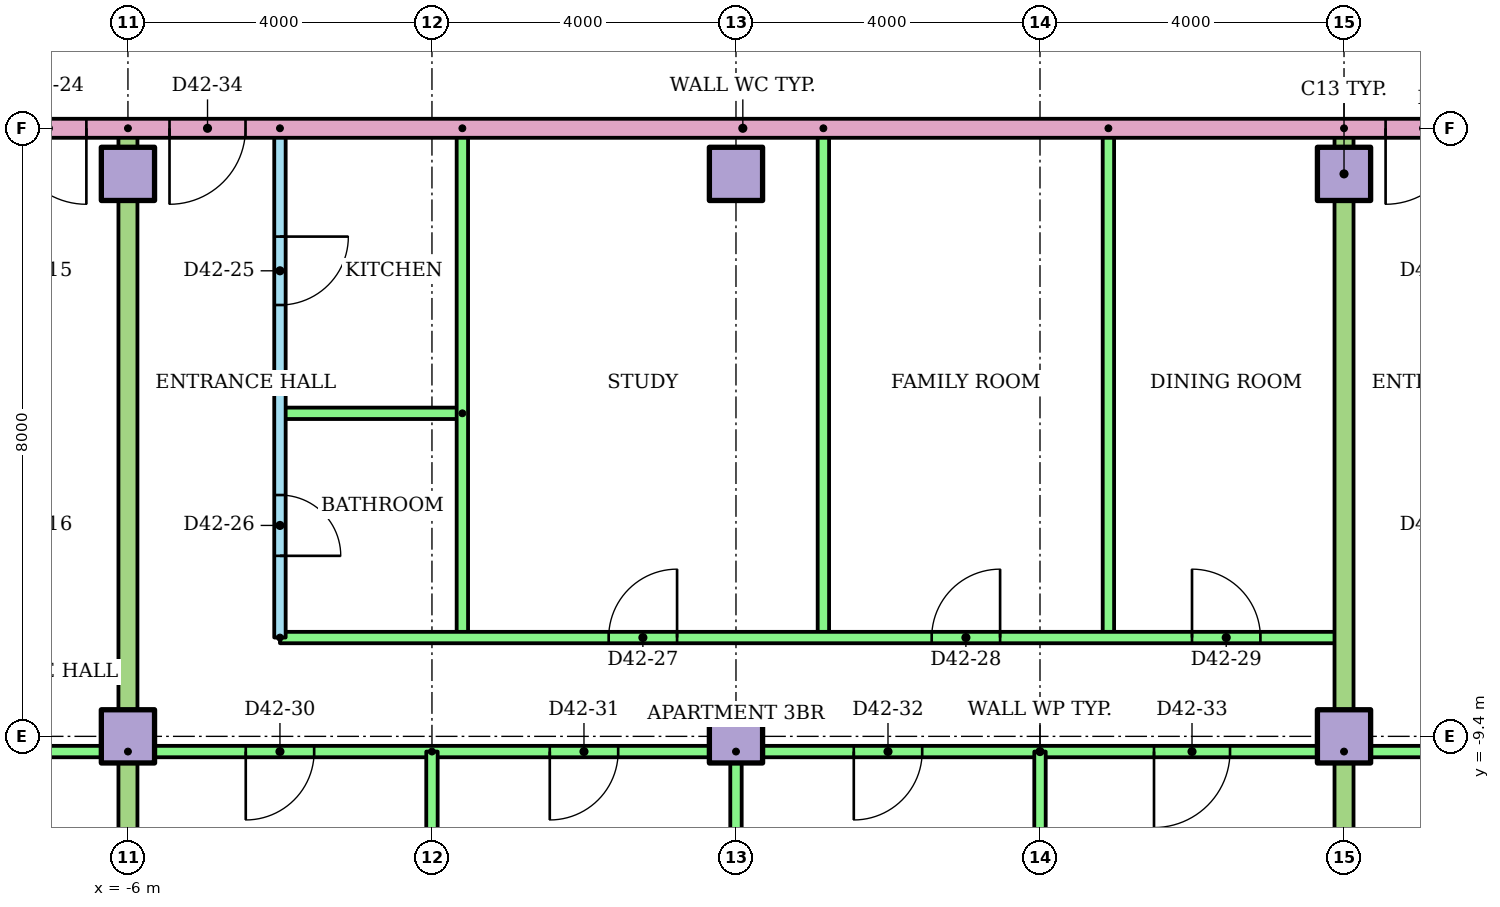
"""IFC4 building model, lengths in metres.
Left out: names, types, materials, properties, quantities, classifications, styles, units other than length and angle.
Written with IfcOpenShell. Run it as: python <this file> out.ifc"""

import sys

from ifc_helpers import new_model, si_unit, direction, frame, frame_2d, origin, origin_2d, place, context, subcontext, project, spatial, rectangle, extrude, element, fill, save


model = new_model("IFC4")
c1 = context("Model", 3, precision=1e-05, world=origin(), true_north=direction((0.0, 1.0)))
c2 = subcontext(c1, "Body", "Model", "MODEL_VIEW")
j1 = project(units=[si_unit("LENGTHUNIT", "METRE"), si_unit("PLANEANGLEUNIT", "RADIAN")], contexts=[c1])
p1 = place(None, origin())
s1 = spatial("IfcSite", under=j1, at=p1, CompositionType="ELEMENT")
p2 = place(p1, origin())
s2 = spatial("IfcBuilding", under=s1, at=p2, CompositionType="ELEMENT")
p3 = place(p2, frame((0.0, 0.0, 165.3)))
s3 = spatial("IfcBuildingStorey", under=s2, at=p3, CompositionType="ELEMENT", Elevation=165.3)
for number, where in (
    (1, (-6.0, -9.4, 0.0)),
    (2, (2.0, -9.4, 0.0)),
    (3, (10.0, -9.4, 0.0)),
    (4, (-6.0, -2.0, 0.0)),
    (5, (2.0, -2.0, 0.0)),
    (6, (10.0, -2.0, 0.0)),
):
    element("IfcColumn", number, at=place(p3, frame(where)), inside=s3, PredefinedType="COLUMN", context=c2, shape_type="SweptSolid", body=[
        extrude(rectangle(XDim=0.7, YDim=0.7, at=origin_2d()), origin(), (0.0, 0.0, 1.0), 3.2),
    ])
p4 = place(p3, frame((-6.0, -9.6, 0.0), z_axis=(0.0, 0.0, 1.0), x_axis=(-1.0, 0.0, 0.0)))
e7 = element("IfcWall", 7, at=p4, inside=s3, PredefinedType="PARTITIONING", context=c2, shape_type="SweptSolid", body=[
    extrude(rectangle(XDim=18.82, YDim=0.15, at=frame_2d((9.41, 0.0))), origin(), (0.0, 0.0, 1.0), 2.4),
])
p5 = place(p4, frame((16.547, 0.0, 0.0)))
e8 = element("IfcOpeningElement", 8, at=p5, cuts=e7, PredefinedType="OPENING", context=c2, shape_type="SweptSolid", body=[
    extrude(rectangle(XDim=0.9, YDim=2.1, at=frame_2d((0.45, 1.05))), frame((0.0, 0.085, 0.0), z_axis=(0.0, -1.0, 0.0), x_axis=(1.0, 0.0, 0.0)), (0.0, 0.0, 1.0), 0.17),
])
p6 = place(p4, frame((10.45, 0.0, 0.0)))
e9 = element("IfcOpeningElement", 9, at=p6, cuts=e7, PredefinedType="OPENING", context=c2, shape_type="SweptSolid", body=[
    extrude(rectangle(XDim=0.9, YDim=2.1, at=frame_2d((0.45, 1.05))), frame((0.0, 0.085, 0.0), z_axis=(0.0, -1.0, 0.0), x_axis=(1.0, 0.0, 0.0)), (0.0, 0.0, 1.0), 0.17),
])
p7 = place(p4, frame((3.5, 0.0, 0.0)))
e10 = element("IfcOpeningElement", 10, at=p7, cuts=e7, PredefinedType="OPENING", context=c2, shape_type="SweptSolid", body=[
    extrude(rectangle(XDim=1.0, YDim=2.1, at=frame_2d((0.5, 1.05))), frame((0.0, 0.085, 0.0), z_axis=(0.0, -1.0, 0.0), x_axis=(1.0, 0.0, 0.0)), (0.0, 0.0, 1.0), 0.17),
])
p8 = place(p3, frame((-4.0, -1.4, 0.0), z_axis=(0.0, 0.0, 1.0), x_axis=(0.0, -1.0, 0.0)))
e11 = element("IfcWall", 11, at=p8, inside=s3, PredefinedType="PARTITIONING", context=c2, shape_type="SweptSolid", body=[
    extrude(rectangle(XDim=6.7, YDim=0.15, at=frame_2d((3.35, 0.0))), origin(), (0.0, 0.0, 1.0), 2.4),
])
p9 = place(p8, frame((1.425, 0.0, 0.0)))
e12 = element("IfcOpeningElement", 12, at=p9, cuts=e11, PredefinedType="OPENING", context=c2, shape_type="SweptSolid", body=[
    extrude(rectangle(XDim=0.9, YDim=2.1, at=frame_2d((0.45, 1.05))), frame((0.0, 0.085, 0.0), z_axis=(0.0, -1.0, 0.0), x_axis=(1.0, 0.0, 0.0)), (0.0, 0.0, 1.0), 0.17),
])
p10 = place(p8, frame((4.825, 0.0, 0.0)))
e13 = element("IfcOpeningElement", 13, at=p10, cuts=e11, PredefinedType="OPENING", context=c2, shape_type="SweptSolid", body=[
    extrude(rectangle(XDim=0.8, YDim=2.1, at=frame_2d((0.4, 1.05))), frame((0.0, 0.085, 0.0), z_axis=(0.0, -1.0, 0.0), x_axis=(1.0, 0.0, 0.0)), (0.0, 0.0, 1.0), 0.17),
])
p11 = place(p3, frame((-1.6, -5.15, 0.0), z_axis=(0.0, 0.0, 1.0), x_axis=(-1.0, 0.0, 0.0)))
e14 = element("IfcWall", 14, at=p11, inside=s3, PredefinedType="PARTITIONING", context=c2, shape_type="SweptSolid", body=[
    extrude(rectangle(XDim=2.4, YDim=0.15, at=frame_2d((1.2, 0.0))), origin(), (0.0, 0.0, 1.0), 2.4),
])
for number, where, z_axis, x_axis in (
    (15, (-1.6, -1.4, 0.0), (0.0, 0.0, 1.0), (0.0, -1.0, 0.0)),
    (16, (3.15, -1.4, 0.0), (0.0, 0.0, 1.0), (0.0, -1.0, 0.0)),
    (17, (6.9, -1.4, 0.0), (0.0, 0.0, 1.0), (0.0, -1.0, 0.0)),
):
    element("IfcWall", number, at=place(p3, frame(where, z_axis=z_axis, x_axis=x_axis)), inside=s3, PredefinedType="PARTITIONING", context=c2, shape_type="SweptSolid", body=[
        extrude(rectangle(XDim=6.7, YDim=0.15, at=frame_2d((3.35, 0.0))), origin(), (0.0, 0.0, 1.0), 2.4),
    ])
p12 = place(p3, frame((-4.0, -8.1, 0.0)))
e18 = element("IfcWall", 18, at=p12, inside=s3, PredefinedType="PARTITIONING", context=c2, shape_type="SweptSolid", body=[
    extrude(rectangle(XDim=14.0, YDim=0.15, at=frame_2d((7.0, 0.0))), origin(), (0.0, 0.0, 1.0), 2.4),
])
p13 = place(p12, frame((4.325, 0.0, 0.0)))
e19 = element("IfcOpeningElement", 19, at=p13, cuts=e18, PredefinedType="OPENING", context=c2, shape_type="SweptSolid", body=[
    extrude(rectangle(XDim=0.9, YDim=2.1, at=frame_2d((0.45, 1.05))), frame((0.0, 0.085, 0.0), z_axis=(0.0, -1.0, 0.0), x_axis=(1.0, 0.0, 0.0)), (0.0, 0.0, 1.0), 0.17),
])
p14 = place(p12, frame((8.575, 0.0, 0.0)))
e20 = element("IfcOpeningElement", 20, at=p14, cuts=e18, PredefinedType="OPENING", context=c2, shape_type="SweptSolid", body=[
    extrude(rectangle(XDim=0.9, YDim=2.1, at=frame_2d((0.45, 1.05))), frame((0.0, 0.085, 0.0), z_axis=(0.0, -1.0, 0.0), x_axis=(1.0, 0.0, 0.0)), (0.0, 0.0, 1.0), 0.17),
])
p15 = place(p12, frame((12.0, 0.0, 0.0)))
e21 = element("IfcOpeningElement", 21, at=p15, cuts=e18, PredefinedType="OPENING", context=c2, shape_type="SweptSolid", body=[
    extrude(rectangle(XDim=0.9, YDim=2.1, at=frame_2d((0.45, 1.05))), frame((0.0, 0.085, 0.0), z_axis=(0.0, -1.0, 0.0), x_axis=(1.0, 0.0, 0.0)), (0.0, 0.0, 1.0), 0.17),
])
p16 = place(p3, frame((10.0, -9.6, 0.0), z_axis=(0.0, 0.0, 1.0), x_axis=(-1.0, 0.0, 0.0)))
e22 = element("IfcWall", 22, at=p16, inside=s3, PredefinedType="PARTITIONING", context=c2, shape_type="SweptSolid", body=[
    extrude(rectangle(XDim=16.0, YDim=0.15, at=frame_2d((8.0, 0.0))), origin(), (0.0, 0.0, 1.0), 2.4),
])
p17 = place(p16, frame((13.55, 0.0, 0.0)))
e23 = element("IfcOpeningElement", 23, at=p17, cuts=e22, PredefinedType="OPENING", context=c2, shape_type="SweptSolid", body=[
    extrude(rectangle(XDim=0.9, YDim=2.1, at=frame_2d((0.45, 1.05))), frame((0.0, 0.085, 0.0), z_axis=(0.0, -1.0, 0.0), x_axis=(1.0, 0.0, 0.0)), (0.0, 0.0, 1.0), 0.17),
])
p18 = place(p16, frame((9.55, 0.0, 0.0)))
e24 = element("IfcOpeningElement", 24, at=p18, cuts=e22, PredefinedType="OPENING", context=c2, shape_type="SweptSolid", body=[
    extrude(rectangle(XDim=0.9, YDim=2.1, at=frame_2d((0.45, 1.05))), frame((0.0, 0.085, 0.0), z_axis=(0.0, -1.0, 0.0), x_axis=(1.0, 0.0, 0.0)), (0.0, 0.0, 1.0), 0.17),
])
p19 = place(p16, frame((5.55, 0.0, 0.0)))
e25 = element("IfcOpeningElement", 25, at=p19, cuts=e22, PredefinedType="OPENING", context=c2, shape_type="SweptSolid", body=[
    extrude(rectangle(XDim=0.9, YDim=2.1, at=frame_2d((0.45, 1.05))), frame((0.0, 0.085, 0.0), z_axis=(0.0, -1.0, 0.0), x_axis=(1.0, 0.0, 0.0)), (0.0, 0.0, 1.0), 0.17),
])
p20 = place(p16, frame((1.5, 0.0, 0.0)))
e26 = element("IfcOpeningElement", 26, at=p20, cuts=e22, PredefinedType="OPENING", context=c2, shape_type="SweptSolid", body=[
    extrude(rectangle(XDim=1.0, YDim=2.1, at=frame_2d((0.5, 1.05))), frame((0.0, 0.085, 0.0), z_axis=(0.0, -1.0, 0.0), x_axis=(1.0, 0.0, 0.0)), (0.0, 0.0, 1.0), 0.17),
])
p21 = place(p3, frame((-2.0, -9.6, 0.0), z_axis=(0.0, 0.0, 1.0), x_axis=(0.0, -1.0, 0.0)))
e27 = element("IfcWall", 27, at=p21, inside=s3, PredefinedType="PARTITIONING", context=c2, shape_type="SweptSolid", body=[
    extrude(rectangle(XDim=6.821, YDim=0.15, at=frame_2d((3.41, 0.0))), origin(), (0.0, 0.0, 1.0), 2.4),
])
p22 = place(p3, frame((2.0, -9.6, 0.0), z_axis=(0.0, 0.0, 1.0), x_axis=(0.0, -1.0, 0.0)))
e28 = element("IfcWall", 28, at=p22, inside=s3, PredefinedType="PARTITIONING", context=c2, shape_type="SweptSolid", body=[
    extrude(rectangle(XDim=6.81, YDim=0.15, at=frame_2d((3.405, 0.0))), origin(), (0.0, 0.0, 1.0), 2.4),
])
p23 = place(p3, frame((6.0, -9.6, 0.0), z_axis=(0.0, 0.0, 1.0), x_axis=(0.0, -1.0, 0.0)))
e29 = element("IfcWall", 29, at=p23, inside=s3, PredefinedType="PARTITIONING", context=c2, shape_type="SweptSolid", body=[
    extrude(rectangle(XDim=6.821, YDim=0.15, at=frame_2d((3.41, 0.0))), origin(), (0.0, 0.0, 1.0), 2.4),
])
p24 = place(p3, frame((-6.0, -1.4, 0.0), z_axis=(0.0, 0.0, 1.0), x_axis=(0.0, -1.0, 0.0)))
e30 = element("IfcWall", 30, at=p24, inside=s3, PredefinedType="PARTITIONING", context=c2, shape_type="SweptSolid", body=[
    extrude(rectangle(XDim=15.01, YDim=0.25, at=frame_2d((7.505, 0.0))), origin(), (0.0, 0.0, 1.0), 2.4),
])
p25 = place(p3, frame((36.82, -9.6, 0.0), z_axis=(0.0, 0.0, 1.0), x_axis=(-1.0, 0.0, 0.0)))
e31 = element("IfcWall", 31, at=p25, inside=s3, PredefinedType="PARTITIONING", context=c2, shape_type="SweptSolid", body=[
    extrude(rectangle(XDim=26.82, YDim=0.15, at=frame_2d((13.41, 0.0))), origin(), (0.0, 0.0, 1.0), 2.4),
])
p26 = place(p25, frame((24.37, 0.0, 0.0)))
e32 = element("IfcOpeningElement", 32, at=p26, cuts=e31, PredefinedType="OPENING", context=c2, shape_type="SweptSolid", body=[
    extrude(rectangle(XDim=0.9, YDim=2.1, at=frame_2d((0.45, 1.05))), frame((0.0, 0.085, 0.0), z_axis=(0.0, -1.0, 0.0), x_axis=(1.0, 0.0, 0.0)), (0.0, 0.0, 1.0), 0.17),
])
p27 = place(p25, frame((20.37, 0.0, 0.0)))
e33 = element("IfcOpeningElement", 33, at=p27, cuts=e31, PredefinedType="OPENING", context=c2, shape_type="SweptSolid", body=[
    extrude(rectangle(XDim=0.9, YDim=2.1, at=frame_2d((0.45, 1.05))), frame((0.0, 0.085, 0.0), z_axis=(0.0, -1.0, 0.0), x_axis=(1.0, 0.0, 0.0)), (0.0, 0.0, 1.0), 0.17),
])
p28 = place(p25, frame((16.37, 0.0, 0.0)))
e34 = element("IfcOpeningElement", 34, at=p28, cuts=e31, PredefinedType="OPENING", context=c2, shape_type="SweptSolid", body=[
    extrude(rectangle(XDim=0.9, YDim=2.1, at=frame_2d((0.45, 1.05))), frame((0.0, 0.085, 0.0), z_axis=(0.0, -1.0, 0.0), x_axis=(1.0, 0.0, 0.0)), (0.0, 0.0, 1.0), 0.17),
])
p29 = place(p25, frame((9.27, 0.0, 0.0)))
e35 = element("IfcOpeningElement", 35, at=p29, cuts=e31, PredefinedType="OPENING", context=c2, shape_type="SweptSolid", body=[
    extrude(rectangle(XDim=1.0, YDim=2.1, at=frame_2d((0.5, 1.05))), frame((0.0, 0.085, 0.0), z_axis=(0.0, -1.0, 0.0), x_axis=(1.0, 0.0, 0.0)), (0.0, 0.0, 1.0), 0.17),
])
p30 = place(p25, frame((1.373, 0.0, 0.0)))
e36 = element("IfcOpeningElement", 36, at=p30, cuts=e31, PredefinedType="OPENING", context=c2, shape_type="SweptSolid", body=[
    extrude(rectangle(XDim=0.9, YDim=2.1, at=frame_2d((0.45, 1.05))), frame((0.0, 0.085, 0.0), z_axis=(0.0, -1.0, 0.0), x_axis=(1.0, 0.0, 0.0)), (0.0, 0.0, 1.0), 0.17),
])
p31 = place(p3, frame((10.0, -1.4, 0.0), z_axis=(0.0, 0.0, 1.0), x_axis=(0.0, -1.0, 0.0)))
e37 = element("IfcWall", 37, at=p31, inside=s3, PredefinedType="PARTITIONING", context=c2, shape_type="SweptSolid", body=[
    extrude(rectangle(XDim=15.01, YDim=0.25, at=frame_2d((7.505, 0.0))), origin(), (0.0, 0.0, 1.0), 2.4),
])
p32 = place(p3, frame((14.0, -1.4, 0.0), z_axis=(0.0, 0.0, 1.0), x_axis=(-1.0, 0.0, 0.0)))
e38 = element("IfcWall", 38, at=p32, inside=s3, PredefinedType="PARTITIONING", context=c2, shape_type="SweptSolid", body=[
    extrude(rectangle(XDim=28.0, YDim=0.25, at=frame_2d((14.0, 0.0))), origin(), (0.0, 0.0, 1.0), 2.4),
])
p33 = place(p32, frame((20.547, 0.0, 0.0)))
e39 = element("IfcOpeningElement", 39, at=p33, cuts=e38, PredefinedType="OPENING", context=c2, shape_type="SweptSolid", body=[
    extrude(rectangle(XDim=1.0, YDim=2.1, at=frame_2d((0.5, 1.05))), frame((0.0, 0.135, 0.0), z_axis=(0.0, -1.0, 0.0), x_axis=(1.0, 0.0, 0.0)), (0.0, 0.0, 1.0), 0.27),
])
p34 = place(p32, frame((18.453, 0.0, 0.0)))
e40 = element("IfcOpeningElement", 40, at=p34, cuts=e38, PredefinedType="OPENING", context=c2, shape_type="SweptSolid", body=[
    extrude(rectangle(XDim=1.0, YDim=2.1, at=frame_2d((0.5, 1.05))), frame((0.0, 0.135, 0.0), z_axis=(0.0, -1.0, 0.0), x_axis=(1.0, 0.0, 0.0)), (0.0, 0.0, 1.0), 0.27),
])
p35 = place(p32, frame((2.453, 0.0, 0.0)))
e41 = element("IfcOpeningElement", 41, at=p35, cuts=e38, PredefinedType="OPENING", context=c2, shape_type="SweptSolid", body=[
    extrude(rectangle(XDim=1.0, YDim=2.1, at=frame_2d((0.5, 1.05))), frame((0.0, 0.135, 0.0), z_axis=(0.0, -1.0, 0.0), x_axis=(1.0, 0.0, 0.0)), (0.0, 0.0, 1.0), 0.27),
])
p36 = place(p33, origin())
e42 = element("IfcDoor", 42, at=p36, inside=s3, OperationType="SINGLE_SWING_LEFT", PredefinedType="DOOR", context=c2, shape_type="SweptSolid", body=[
    extrude(rectangle(XDim=1.0, YDim=2.1, at=frame_2d((0.5, 1.05))), frame((0.0, 0.025, 0.0), z_axis=(0.0, -1.0, 0.0), x_axis=(1.0, 0.0, 0.0)), (0.0, 0.0, 1.0), 0.05),
])
fill(e39, e42)
p37 = place(p9, origin())
e43 = element("IfcDoor", 43, at=p37, inside=s3, OperationType="SINGLE_SWING_LEFT", PredefinedType="DOOR", context=c2, shape_type="SweptSolid", body=[
    extrude(rectangle(XDim=0.9, YDim=2.1, at=frame_2d((0.45, 1.05))), frame((0.0, 0.025, 0.0), z_axis=(0.0, -1.0, 0.0), x_axis=(1.0, 0.0, 0.0)), (0.0, 0.0, 1.0), 0.05),
])
fill(e12, e43)
p38 = place(p10, origin())
e44 = element("IfcDoor", 44, at=p38, inside=s3, OperationType="SINGLE_SWING_RIGHT", PredefinedType="DOOR", context=c2, shape_type="SweptSolid", body=[
    extrude(rectangle(XDim=0.8, YDim=2.1, at=frame_2d((0.4, 1.05))), frame((0.0, 0.025, 0.0), z_axis=(0.0, -1.0, 0.0), x_axis=(1.0, 0.0, 0.0)), (0.0, 0.0, 1.0), 0.05),
])
fill(e13, e44)
p39 = place(p13, origin())
e45 = element("IfcDoor", 45, at=p39, inside=s3, OperationType="SINGLE_SWING_RIGHT", PredefinedType="DOOR", context=c2, shape_type="SweptSolid", body=[
    extrude(rectangle(XDim=0.9, YDim=2.1, at=frame_2d((0.45, 1.05))), frame((0.0, 0.025, 0.0), z_axis=(0.0, -1.0, 0.0), x_axis=(1.0, 0.0, 0.0)), (0.0, 0.0, 1.0), 0.05),
])
fill(e19, e45)
p40 = place(p14, origin())
e46 = element("IfcDoor", 46, at=p40, inside=s3, OperationType="SINGLE_SWING_RIGHT", PredefinedType="DOOR", context=c2, shape_type="SweptSolid", body=[
    extrude(rectangle(XDim=0.9, YDim=2.1, at=frame_2d((0.45, 1.05))), frame((0.0, 0.025, 0.0), z_axis=(0.0, -1.0, 0.0), x_axis=(1.0, 0.0, 0.0)), (0.0, 0.0, 1.0), 0.05),
])
fill(e20, e46)
p41 = place(p15, origin())
e47 = element("IfcDoor", 47, at=p41, inside=s3, OperationType="SINGLE_SWING_LEFT", PredefinedType="DOOR", context=c2, shape_type="SweptSolid", body=[
    extrude(rectangle(XDim=0.9, YDim=2.1, at=frame_2d((0.45, 1.05))), frame((0.0, 0.025, 0.0), z_axis=(0.0, -1.0, 0.0), x_axis=(1.0, 0.0, 0.0)), (0.0, 0.0, 1.0), 0.05),
])
fill(e21, e47)
p42 = place(p17, origin())
e48 = element("IfcDoor", 48, at=p42, inside=s3, OperationType="SINGLE_SWING_RIGHT", PredefinedType="DOOR", context=c2, shape_type="SweptSolid", body=[
    extrude(rectangle(XDim=0.9, YDim=2.1, at=frame_2d((0.45, 1.05))), frame((0.0, 0.025, 0.0), z_axis=(0.0, -1.0, 0.0), x_axis=(1.0, 0.0, 0.0)), (0.0, 0.0, 1.0), 0.05),
])
fill(e23, e48)
p43 = place(p18, origin())
e49 = element("IfcDoor", 49, at=p43, inside=s3, OperationType="SINGLE_SWING_RIGHT", PredefinedType="DOOR", context=c2, shape_type="SweptSolid", body=[
    extrude(rectangle(XDim=0.9, YDim=2.1, at=frame_2d((0.45, 1.05))), frame((0.0, 0.025, 0.0), z_axis=(0.0, -1.0, 0.0), x_axis=(1.0, 0.0, 0.0)), (0.0, 0.0, 1.0), 0.05),
])
fill(e24, e49)
p44 = place(p19, origin())
e50 = element("IfcDoor", 50, at=p44, inside=s3, OperationType="SINGLE_SWING_RIGHT", PredefinedType="DOOR", context=c2, shape_type="SweptSolid", body=[
    extrude(rectangle(XDim=0.9, YDim=2.1, at=frame_2d((0.45, 1.05))), frame((0.0, 0.025, 0.0), z_axis=(0.0, -1.0, 0.0), x_axis=(1.0, 0.0, 0.0)), (0.0, 0.0, 1.0), 0.05),
])
fill(e25, e50)
p45 = place(p20, origin())
e51 = element("IfcDoor", 51, at=p45, inside=s3, OperationType="SINGLE_SWING_RIGHT", PredefinedType="DOOR", context=c2, shape_type="SweptSolid", body=[
    extrude(rectangle(XDim=1.0, YDim=2.1, at=frame_2d((0.5, 1.05))), frame((0.0, 0.025, 0.0), z_axis=(0.0, -1.0, 0.0), x_axis=(1.0, 0.0, 0.0)), (0.0, 0.0, 1.0), 0.05),
])
fill(e26, e51)
p46 = place(p34, origin())
e52 = element("IfcDoor", 52, at=p46, inside=s3, OperationType="SINGLE_SWING_RIGHT", PredefinedType="DOOR", context=c2, shape_type="SweptSolid", body=[
    extrude(rectangle(XDim=1.0, YDim=2.1, at=frame_2d((0.5, 1.05))), frame((0.0, 0.025, 0.0), z_axis=(0.0, -1.0, 0.0), x_axis=(1.0, 0.0, 0.0)), (0.0, 0.0, 1.0), 0.05),
])
fill(e40, e52)
p47 = place(p35, origin())
e53 = element("IfcDoor", 53, at=p47, inside=s3, OperationType="SINGLE_SWING_RIGHT", PredefinedType="DOOR", context=c2, shape_type="SweptSolid", body=[
    extrude(rectangle(XDim=1.0, YDim=2.1, at=frame_2d((0.5, 1.05))), frame((0.0, 0.025, 0.0), z_axis=(0.0, -1.0, 0.0), x_axis=(1.0, 0.0, 0.0)), (0.0, 0.0, 1.0), 0.05),
])
fill(e41, e53)
save(model, sys.argv[1])
